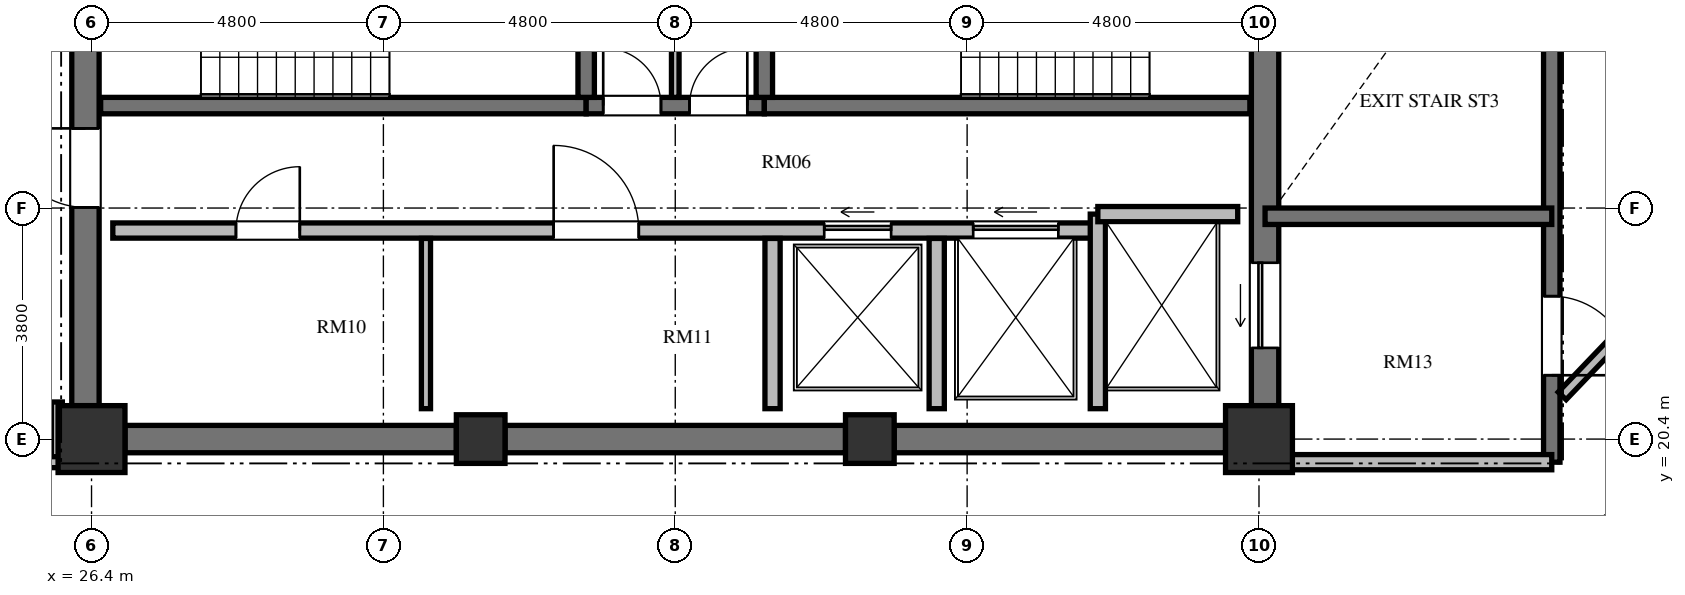
"""IFC4 building model, lengths in metres.
Left out: names, types, materials, properties, quantities, classifications, styles, units other than length and angle.
Written with IfcOpenShell. Run it as: python <this file> out.ifc"""

import sys

from ifc_helpers import new_model, si_unit, direction, frame, frame_2d, origin, origin_2d, place, context, subcontext, project, spatial, rectangle, extrude, element, fill, save


model = new_model("IFC4")
c1 = context("Model", 3, precision=1e-05, world=origin(), true_north=direction((0.0, 1.0)))
c2 = subcontext(c1, "Body", "Model", "MODEL_VIEW")
j1 = project(units=[si_unit("LENGTHUNIT", "METRE"), si_unit("PLANEANGLEUNIT", "RADIAN")], contexts=[c1])
p1 = place(None, origin())
s1 = spatial("IfcSite", under=j1, at=p1, CompositionType="ELEMENT")
p2 = place(p1, origin())
s2 = spatial("IfcBuilding", under=s1, at=p2, CompositionType="ELEMENT")
p3 = place(p2, frame((0.0, 0.0, 234.96)))
s3 = spatial("IfcBuildingStorey", under=s2, at=p3, CompositionType="ELEMENT", Elevation=234.96)
p4 = place(p3, frame((26.4, 20.4, 0.0), z_axis=(0.0, 0.0, 1.0), x_axis=(1.0, 0.0, 0.0)))
e1 = element("IfcColumn", 1, at=p4, inside=s3, PredefinedType="COLUMN", context=c2, shape_type="SweptSolid", body=[
    extrude(rectangle(XDim=1.1, YDim=1.1, at=origin_2d()), origin(), (0.0, 0.0, 1.0), 3.648),
])
for number, where, z_axis, x_axis in (
    (2, (32.8, 20.4, 0.0), (0.0, 0.0, 1.0), (1.0, 0.0, 0.0)),
    (3, (39.2, 20.4, 0.0), (0.0, 0.0, 1.0), (1.0, 0.0, 0.0)),
):
    element("IfcColumn", number, at=place(p3, frame(where, z_axis=z_axis, x_axis=x_axis)), inside=s3, PredefinedType="COLUMN", context=c2, shape_type="SweptSolid", body=[
        extrude(rectangle(XDim=0.8, YDim=0.8, at=origin_2d()), origin(), (0.0, 0.0, 1.0), 3.648),
    ])
p5 = place(p3, frame((45.6, 20.4, 0.0), z_axis=(0.0, 0.0, 1.0), x_axis=(1.0, 0.0, 0.0)))
e4 = element("IfcColumn", 4, at=p5, inside=s3, PredefinedType="COLUMN", context=c2, shape_type="SweptSolid", body=[
    extrude(rectangle(XDim=1.1, YDim=1.1, at=origin_2d()), origin(), (0.0, 0.0, 1.0), 3.648),
])
p6 = place(p3, frame((26.3, 20.95, 0.0), z_axis=(0.0, 0.0, 1.0), x_axis=(0.0, 1.0, 0.0)))
e5 = element("IfcWall", 5, at=p6, inside=s3, PredefinedType="SHEAR", context=c2, shape_type="SweptSolid", body=[
    extrude(rectangle(XDim=14.1, YDim=0.45, at=frame_2d((7.05, 0.0))), origin(), (0.0, 0.0, 1.0), 3.648),
])
p7 = place(p6, frame((6.5, 0.0, 0.0)))
e6 = element("IfcOpeningElement", 6, at=p7, cuts=e5, PredefinedType="OPENING", context=c2, shape_type="SweptSolid", body=[
    extrude(rectangle(XDim=1.2, YDim=2.15, at=frame_2d((0.6, 1.075))), frame((0.0, 0.235, 0.0), z_axis=(0.0, -1.0, 0.0), x_axis=(1.0, 0.0, 0.0)), (0.0, 0.0, 1.0), 0.47),
])
p8 = place(p6, frame((9.6, 0.0, 0.0)))
e7 = element("IfcOpeningElement", 7, at=p8, cuts=e5, PredefinedType="OPENING", context=c2, shape_type="SweptSolid", body=[
    extrude(rectangle(XDim=1.3, YDim=2.2, at=frame_2d((0.65, 1.1))), frame((0.0, 0.235, 0.0), z_axis=(0.0, -1.0, 0.0), x_axis=(1.0, 0.0, 0.0)), (0.0, 0.0, 1.0), 0.47),
])
p9 = place(p6, frame((3.26, 0.0, 0.0)))
e8 = element("IfcOpeningElement", 8, at=p9, cuts=e5, PredefinedType="OPENING", context=c2, shape_type="SweptSolid", body=[
    extrude(rectangle(XDim=1.3, YDim=2.2, at=frame_2d((0.65, 1.1))), frame((0.0, 0.235, 0.0), z_axis=(0.0, -1.0, 0.0), x_axis=(1.0, 0.0, 0.0)), (0.0, 0.0, 1.0), 0.47),
])
p10 = place(p3, frame((45.7, 20.95, 0.0), z_axis=(0.0, 0.0, 1.0), x_axis=(0.0, 1.0, 0.0)))
e9 = element("IfcWall", 9, at=p10, inside=s3, PredefinedType="SHEAR", context=c2, shape_type="SweptSolid", body=[
    extrude(rectangle(XDim=14.1, YDim=0.45, at=frame_2d((7.05, 0.0))), origin(), (0.0, 0.0, 1.0), 3.648),
])
p11 = place(p10, frame((11.75, 0.0, 0.0)))
e10 = element("IfcOpeningElement", 10, at=p11, cuts=e9, PredefinedType="OPENING", context=c2, shape_type="SweptSolid", body=[
    extrude(rectangle(XDim=1.4, YDim=2.3, at=frame_2d((0.7, 1.15))), frame((0.0, 0.235, 0.0), z_axis=(0.0, -1.0, 0.0), x_axis=(1.0, 0.0, 0.0)), (0.0, 0.0, 1.0), 0.47),
])
p12 = place(p10, frame((0.95, 0.0, 0.0)))
e11 = element("IfcOpeningElement", 11, at=p12, cuts=e9, PredefinedType="OPENING", context=c2, shape_type="SweptSolid", body=[
    extrude(rectangle(XDim=1.4, YDim=2.3, at=frame_2d((0.7, 1.15))), frame((0.0, 0.235, 0.0), z_axis=(0.0, -1.0, 0.0), x_axis=(1.0, 0.0, 0.0)), (0.0, 0.0, 1.0), 0.47),
])
p13 = place(p3, frame((26.95, 20.4, 0.0), z_axis=(0.0, 0.0, 1.0), x_axis=(1.0, 0.0, 0.0)))
e12 = element("IfcWall", 12, at=p13, inside=s3, PredefinedType="SHEAR", context=c2, shape_type="SweptSolid", body=[
    extrude(rectangle(XDim=5.45, YDim=0.45, at=frame_2d((2.725, 0.0))), origin(), (0.0, 0.0, 1.0), 3.648),
])
p14 = place(p3, frame((33.2, 20.4, 0.0), z_axis=(0.0, 0.0, 1.0), x_axis=(1.0, 0.0, 0.0)))
e13 = element("IfcWall", 13, at=p14, inside=s3, PredefinedType="SHEAR", context=c2, shape_type="SweptSolid", body=[
    extrude(rectangle(XDim=5.6, YDim=0.45, at=frame_2d((2.8, 0.0))), origin(), (0.0, 0.0, 1.0), 3.648),
])
p15 = place(p3, frame((39.6, 20.4, 0.0), z_axis=(0.0, 0.0, 1.0), x_axis=(1.0, 0.0, 0.0)))
e14 = element("IfcWall", 14, at=p15, inside=s3, PredefinedType="SHEAR", context=c2, shape_type="SweptSolid", body=[
    extrude(rectangle(XDim=5.45, YDim=0.45, at=frame_2d((2.725, 0.0))), origin(), (0.0, 0.0, 1.0), 3.648),
])
p16 = place(p3, frame((26.55, 25.885, 0.0), z_axis=(0.0, 0.0, 1.0), x_axis=(1.0, 0.0, 0.0)))
e15 = element("IfcWall", 15, at=p16, inside=s3, PredefinedType="SHEAR", context=c2, shape_type="SweptSolid", body=[
    extrude(rectangle(XDim=7.985, YDim=0.27, at=frame_2d((3.992, 0.0))), origin(), (0.0, 0.0, 1.0), 3.648),
])
p17 = place(p3, frame((34.535, 25.885, 0.0), z_axis=(0.0, 0.0, 1.0), x_axis=(1.0, 0.0, 0.0)))
e16 = element("IfcWall", 16, at=p17, inside=s3, PredefinedType="SHEAR", context=c2, shape_type="SweptSolid", body=[
    extrude(rectangle(XDim=2.93, YDim=0.27, at=frame_2d((1.465, 0.0))), origin(), (0.0, 0.0, 1.0), 3.648),
])
p18 = place(p17, frame((0.28, 0.0, 0.0)))
e17 = element("IfcOpeningElement", 17, at=p18, cuts=e16, PredefinedType="OPENING", context=c2, shape_type="SweptSolid", body=[
    extrude(rectangle(XDim=0.95, YDim=2.1, at=frame_2d((0.475, 1.05))), frame((0.0, 0.145, 0.0), z_axis=(0.0, -1.0, 0.0), x_axis=(1.0, 0.0, 0.0)), (0.0, 0.0, 1.0), 0.29),
])
p19 = place(p17, frame((1.7, 0.0, 0.0)))
e18 = element("IfcOpeningElement", 18, at=p19, cuts=e16, PredefinedType="OPENING", context=c2, shape_type="SweptSolid", body=[
    extrude(rectangle(XDim=0.95, YDim=2.1, at=frame_2d((0.475, 1.05))), frame((0.0, 0.145, 0.0), z_axis=(0.0, -1.0, 0.0), x_axis=(1.0, 0.0, 0.0)), (0.0, 0.0, 1.0), 0.29),
])
p20 = place(p3, frame((37.465, 25.885, 0.0), z_axis=(0.0, 0.0, 1.0), x_axis=(1.0, 0.0, 0.0)))
e19 = element("IfcWall", 19, at=p20, inside=s3, PredefinedType="SHEAR", context=c2, shape_type="SweptSolid", body=[
    extrude(rectangle(XDim=7.985, YDim=0.27, at=frame_2d((3.992, 0.0))), origin(), (0.0, 0.0, 1.0), 3.648),
])
for number, where, z_axis, x_axis in (
    (20, (34.535, 26.02, 0.0), (0.0, 0.0, 1.0), (0.0, 1.0, 0.0)),
    (21, (37.465, 26.02, 0.0), (0.0, 0.0, 1.0), (0.0, 1.0, 0.0)),
):
    element("IfcWall", number, at=place(p3, frame(where, z_axis=z_axis, x_axis=x_axis)), inside=s3, PredefinedType="SHEAR", context=c2, shape_type="SweptSolid", body=[
        extrude(rectangle(XDim=4.08, YDim=0.27, at=frame_2d((2.04, 0.0))), origin(), (0.0, 0.0, 1.0), 3.648),
    ])
p21 = place(p3, frame((36.0, 26.02, 0.0), z_axis=(0.0, 0.0, 1.0), x_axis=(0.0, 1.0, 0.0)))
e22 = element("IfcWall", 22, at=p21, inside=s3, PredefinedType="PARTITIONING", context=c2, shape_type="SweptSolid", body=[
    extrude(rectangle(XDim=4.08, YDim=0.125, at=frame_2d((2.04, 0.0))), origin(), (0.0, 0.0, 1.0), 3.448),
])
p22 = place(p3, frame((26.75, 23.83, 0.0), z_axis=(0.0, 0.0, 1.0), x_axis=(1.0, 0.0, 0.0)))
e23 = element("IfcWall", 23, at=p22, inside=s3, PredefinedType="SOLIDWALL", context=c2, shape_type="SweptSolid", body=[
    extrude(rectangle(XDim=16.2, YDim=0.25, at=frame_2d((8.1, 0.0))), origin(), (0.0, 0.0, 1.0), 3.448),
])
p23 = place(p22, frame((2.025, 0.0, 0.0)))
e24 = element("IfcOpeningElement", 24, at=p23, cuts=e23, PredefinedType="OPENING", context=c2, shape_type="SweptSolid", body=[
    extrude(rectangle(XDim=1.05, YDim=2.15, at=frame_2d((0.525, 1.075))), frame((0.0, 0.135, 0.0), z_axis=(0.0, -1.0, 0.0), x_axis=(1.0, 0.0, 0.0)), (0.0, 0.0, 1.0), 0.27),
])
p24 = place(p22, frame((7.25, 0.0, 0.0)))
e25 = element("IfcOpeningElement", 25, at=p24, cuts=e23, PredefinedType="OPENING", context=c2, shape_type="SweptSolid", body=[
    extrude(rectangle(XDim=1.4, YDim=2.2, at=frame_2d((0.7, 1.1))), frame((0.0, 0.135, 0.0), z_axis=(0.0, -1.0, 0.0), x_axis=(1.0, 0.0, 0.0)), (0.0, 0.0, 1.0), 0.27),
])
p25 = place(p22, frame((11.7, 0.0, 0.0)))
e26 = element("IfcOpeningElement", 26, at=p25, cuts=e23, PredefinedType="OPENING", context=c2, shape_type="SweptSolid", body=[
    extrude(rectangle(XDim=1.1, YDim=2.2, at=frame_2d((0.55, 1.1))), frame((0.0, 0.135, 0.0), z_axis=(0.0, -1.0, 0.0), x_axis=(1.0, 0.0, 0.0)), (0.0, 0.0, 1.0), 0.27),
])
p26 = place(p22, frame((14.15, 0.0, 0.0)))
e27 = element("IfcOpeningElement", 27, at=p26, cuts=e23, PredefinedType="OPENING", context=c2, shape_type="SweptSolid", body=[
    extrude(rectangle(XDim=1.4, YDim=2.3, at=frame_2d((0.7, 1.15))), frame((0.0, 0.135, 0.0), z_axis=(0.0, -1.0, 0.0), x_axis=(1.0, 0.0, 0.0)), (0.0, 0.0, 1.0), 0.27),
])
p27 = place(p3, frame((42.95, 20.9, 0.0), z_axis=(0.0, 0.0, 1.0), x_axis=(0.0, 1.0, 0.0)))
e28 = element("IfcWall", 28, at=p27, inside=s3, PredefinedType="SOLIDWALL", context=c2, shape_type="SweptSolid", body=[
    extrude(rectangle(XDim=3.2, YDim=0.25, at=frame_2d((1.6, 0.0))), origin(), (0.0, 0.0, 1.0), 3.448),
])
p28 = place(p3, frame((42.95, 24.1, 0.0), z_axis=(0.0, 0.0, 1.0), x_axis=(1.0, 0.0, 0.0)))
e29 = element("IfcWall", 29, at=p28, inside=s3, PredefinedType="SOLIDWALL", context=c2, shape_type="SweptSolid", body=[
    extrude(rectangle(XDim=2.3, YDim=0.25, at=frame_2d((1.15, 0.0))), origin(), (0.0, 0.0, 1.0), 3.448),
])
for number, where, z_axis, x_axis in (
    (30, (37.6, 20.9, 0.0), (0.0, 0.0, 1.0), (0.0, 1.0, 0.0)),
    (31, (40.3, 20.9, 0.0), (0.0, 0.0, 1.0), (0.0, 1.0, 0.0)),
):
    element("IfcWall", number, at=place(p3, frame(where, z_axis=z_axis, x_axis=x_axis)), inside=s3, PredefinedType="SOLIDWALL", context=c2, shape_type="SweptSolid", body=[
        extrude(rectangle(XDim=2.8, YDim=0.25, at=frame_2d((1.4, 0.0))), origin(), (0.0, 0.0, 1.0), 3.448),
    ])
p29 = place(p3, frame((31.9, 20.9, 0.0), z_axis=(0.0, 0.0, 1.0), x_axis=(0.0, 1.0, 0.0)))
e32 = element("IfcWall", 32, at=p29, inside=s3, PredefinedType="PARTITIONING", context=c2, shape_type="SweptSolid", body=[
    extrude(rectangle(XDim=2.8, YDim=0.15, at=frame_2d((1.4, 0.0))), origin(), (0.0, 0.0, 1.0), 3.448),
])
p30 = place(p3, frame((50.415, 35.845, 0.0), z_axis=(0.0, 0.0, 1.0), x_axis=(0.0, -1.0, 0.0)))
e33 = element("IfcWall", 33, at=p30, inside=s3, PredefinedType="SHEAR", context=c2, shape_type="SweptSolid", body=[
    extrude(rectangle(XDim=15.825, YDim=0.27, at=frame_2d((7.913, 0.0))), origin(), (0.0, 0.0, 1.0), 3.648),
])
p31 = place(p30, frame((4.445, 0.0, 0.0)))
e34 = element("IfcOpeningElement", 34, at=p31, cuts=e33, PredefinedType="OPENING", context=c2, shape_type="SweptSolid", body=[
    extrude(rectangle(XDim=1.2, YDim=2.15, at=frame_2d((0.6, 1.075))), frame((0.0, 0.145, 0.0), z_axis=(0.0, -1.0, 0.0), x_axis=(1.0, 0.0, 0.0)), (0.0, 0.0, 1.0), 0.29),
])
p32 = place(p30, frame((1.295, 0.0, 0.0)))
e35 = element("IfcOpeningElement", 35, at=p32, cuts=e33, PredefinedType="OPENING", context=c2, shape_type="SweptSolid", body=[
    extrude(rectangle(XDim=1.3, YDim=2.2, at=frame_2d((0.65, 1.1))), frame((0.0, 0.145, 0.0), z_axis=(0.0, -1.0, 0.0), x_axis=(1.0, 0.0, 0.0)), (0.0, 0.0, 1.0), 0.29),
])
p33 = place(p30, frame((13.095, 0.0, 0.0)))
e36 = element("IfcOpeningElement", 36, at=p33, cuts=e33, PredefinedType="OPENING", context=c2, shape_type="SweptSolid", body=[
    extrude(rectangle(XDim=1.3, YDim=2.2, at=frame_2d((0.65, 1.1))), frame((0.0, 0.145, 0.0), z_axis=(0.0, -1.0, 0.0), x_axis=(1.0, 0.0, 0.0)), (0.0, 0.0, 1.0), 0.29),
])
p34 = place(p3, frame((45.7, 24.065, 0.0), z_axis=(0.0, 0.0, 1.0), x_axis=(1.0, 0.0, 0.0)))
e37 = element("IfcWall", 37, at=p34, inside=s3, PredefinedType="SHEAR", context=c2, shape_type="SweptSolid", body=[
    extrude(rectangle(XDim=4.715, YDim=0.27, at=frame_2d((2.357, 0.0))), origin(), (0.0, 0.0, 1.0), 3.648),
])
p35 = place(p3, frame((45.7, 20.02, 0.0), z_axis=(0.0, 0.0, 1.0), x_axis=(1.0, 0.0, 0.0)))
e38 = element("IfcWall", 38, at=p35, inside=s3, PredefinedType="SOLIDWALL", context=c2, shape_type="SweptSolid", body=[
    extrude(rectangle(XDim=4.715, YDim=0.25, at=frame_2d((2.357, 0.0))), origin(), (0.0, 0.0, 1.0), 3.448),
])
p36 = place(p3, frame((53.078, 23.714, 0.0), z_axis=(0.0, 0.0, 1.0), x_axis=(-0.691353379446, -0.722516785085, 0.0)))
e39 = element("IfcWall", 39, at=p36, inside=s3, PredefinedType="PARTITIONING", context=c2, shape_type="SweptSolid", body=[
    extrude(rectangle(XDim=3.604, YDim=0.18, at=frame_2d((1.802, 0.0))), origin(), (0.0, 0.0, 1.0), 3.448),
])
p37 = place(p3, frame((25.83, 21.01, 0.0), z_axis=(0.0, 0.0, 1.0), x_axis=(0.0, -1.0, 0.0)))
e40 = element("IfcWall", 40, at=p37, inside=s3, PredefinedType="PARTITIONING", context=c2, shape_type="SweptSolid", body=[
    extrude(rectangle(XDim=1.03, YDim=0.18, at=frame_2d((0.515, 0.0))), origin(), (0.0, 0.0, 1.0), 3.448),
])
p38 = place(p3, frame((25.87, 20.02, 0.0), z_axis=(0.0, 0.0, 1.0), x_axis=(-1.0, 0.0, 0.0)))
e41 = element("IfcWall", 41, at=p38, inside=s3, PredefinedType="PARTITIONING", context=c2, shape_type="SweptSolid", body=[
    extrude(rectangle(XDim=2.56, YDim=0.18, at=frame_2d((1.28, 0.0))), origin(), (0.0, 0.0, 1.0), 3.448),
])
p39 = place(p18, origin())
e42 = element("IfcDoor", 42, at=p39, inside=s3, OperationType="SINGLE_SWING_LEFT", PredefinedType="DOOR", context=c2, shape_type="SweptSolid", body=[
    extrude(rectangle(XDim=0.95, YDim=2.1, at=frame_2d((0.475, 1.05))), frame((0.0, 0.025, 0.0), z_axis=(0.0, -1.0, 0.0), x_axis=(1.0, 0.0, 0.0)), (0.0, 0.0, 1.0), 0.05),
])
fill(e17, e42)
p40 = place(p19, origin())
e43 = element("IfcDoor", 43, at=p40, inside=s3, OperationType="SINGLE_SWING_RIGHT", PredefinedType="DOOR", context=c2, shape_type="SweptSolid", body=[
    extrude(rectangle(XDim=0.95, YDim=2.1, at=frame_2d((0.475, 1.05))), frame((0.0, 0.025, 0.0), z_axis=(0.0, -1.0, 0.0), x_axis=(1.0, 0.0, 0.0)), (0.0, 0.0, 1.0), 0.05),
])
fill(e18, e43)
p41 = place(p9, origin())
e44 = element("IfcDoor", 44, at=p41, inside=s3, OperationType="SINGLE_SWING_RIGHT", PredefinedType="DOOR", context=c2, shape_type="SweptSolid", body=[
    extrude(rectangle(XDim=1.3, YDim=2.2, at=frame_2d((0.65, 1.1))), frame((0.0, 0.025, 0.0), z_axis=(0.0, -1.0, 0.0), x_axis=(1.0, 0.0, 0.0)), (0.0, 0.0, 1.0), 0.05),
])
fill(e8, e44)
p42 = place(p23, origin())
e45 = element("IfcDoor", 45, at=p42, inside=s3, OperationType="SINGLE_SWING_RIGHT", PredefinedType="DOOR", context=c2, shape_type="SweptSolid", body=[
    extrude(rectangle(XDim=1.05, YDim=2.15, at=frame_2d((0.525, 1.075))), frame((0.0, 0.025, 0.0), z_axis=(0.0, -1.0, 0.0), x_axis=(1.0, 0.0, 0.0)), (0.0, 0.0, 1.0), 0.05),
])
fill(e24, e45)
p43 = place(p24, origin())
e46 = element("IfcDoor", 46, at=p43, inside=s3, OperationType="SINGLE_SWING_LEFT", PredefinedType="DOOR", context=c2, shape_type="SweptSolid", body=[
    extrude(rectangle(XDim=1.4, YDim=2.2, at=frame_2d((0.7, 1.1))), frame((0.0, 0.025, 0.0), z_axis=(0.0, -1.0, 0.0), x_axis=(1.0, 0.0, 0.0)), (0.0, 0.0, 1.0), 0.05),
])
fill(e25, e46)
p44 = place(p25, origin())
e47 = element("IfcDoor", 47, at=p44, inside=s3, OperationType="SLIDING_TO_LEFT", PredefinedType="DOOR", context=c2, shape_type="SweptSolid", body=[
    extrude(rectangle(XDim=1.1, YDim=2.2, at=frame_2d((0.55, 1.1))), frame((0.0, 0.025, 0.0), z_axis=(0.0, -1.0, 0.0), x_axis=(1.0, 0.0, 0.0)), (0.0, 0.0, 1.0), 0.05),
])
fill(e26, e47)
p45 = place(p12, origin())
e48 = element("IfcDoor", 48, at=p45, inside=s3, OperationType="SLIDING_TO_LEFT", PredefinedType="DOOR", context=c2, shape_type="SweptSolid", body=[
    extrude(rectangle(XDim=1.4, YDim=2.3, at=frame_2d((0.7, 1.15))), frame((0.0, 0.025, 0.0), z_axis=(0.0, -1.0, 0.0), x_axis=(1.0, 0.0, 0.0)), (0.0, 0.0, 1.0), 0.05),
])
fill(e11, e48)
p46 = place(p26, origin())
e49 = element("IfcDoor", 49, at=p46, inside=s3, OperationType="SLIDING_TO_LEFT", PredefinedType="DOOR", context=c2, shape_type="SweptSolid", body=[
    extrude(rectangle(XDim=1.4, YDim=2.3, at=frame_2d((0.7, 1.15))), frame((0.0, 0.025, 0.0), z_axis=(0.0, -1.0, 0.0), x_axis=(1.0, 0.0, 0.0)), (0.0, 0.0, 1.0), 0.05),
])
fill(e27, e49)
p47 = place(p33, origin())
e50 = element("IfcDoor", 50, at=p47, inside=s3, OperationType="SINGLE_SWING_RIGHT", PredefinedType="DOOR", context=c2, shape_type="SweptSolid", body=[
    extrude(rectangle(XDim=1.3, YDim=2.2, at=frame_2d((0.65, 1.1))), frame((0.0, 0.025, 0.0), z_axis=(0.0, -1.0, 0.0), x_axis=(1.0, 0.0, 0.0)), (0.0, 0.0, 1.0), 0.05),
])
fill(e36, e50)
save(model, sys.argv[1])
